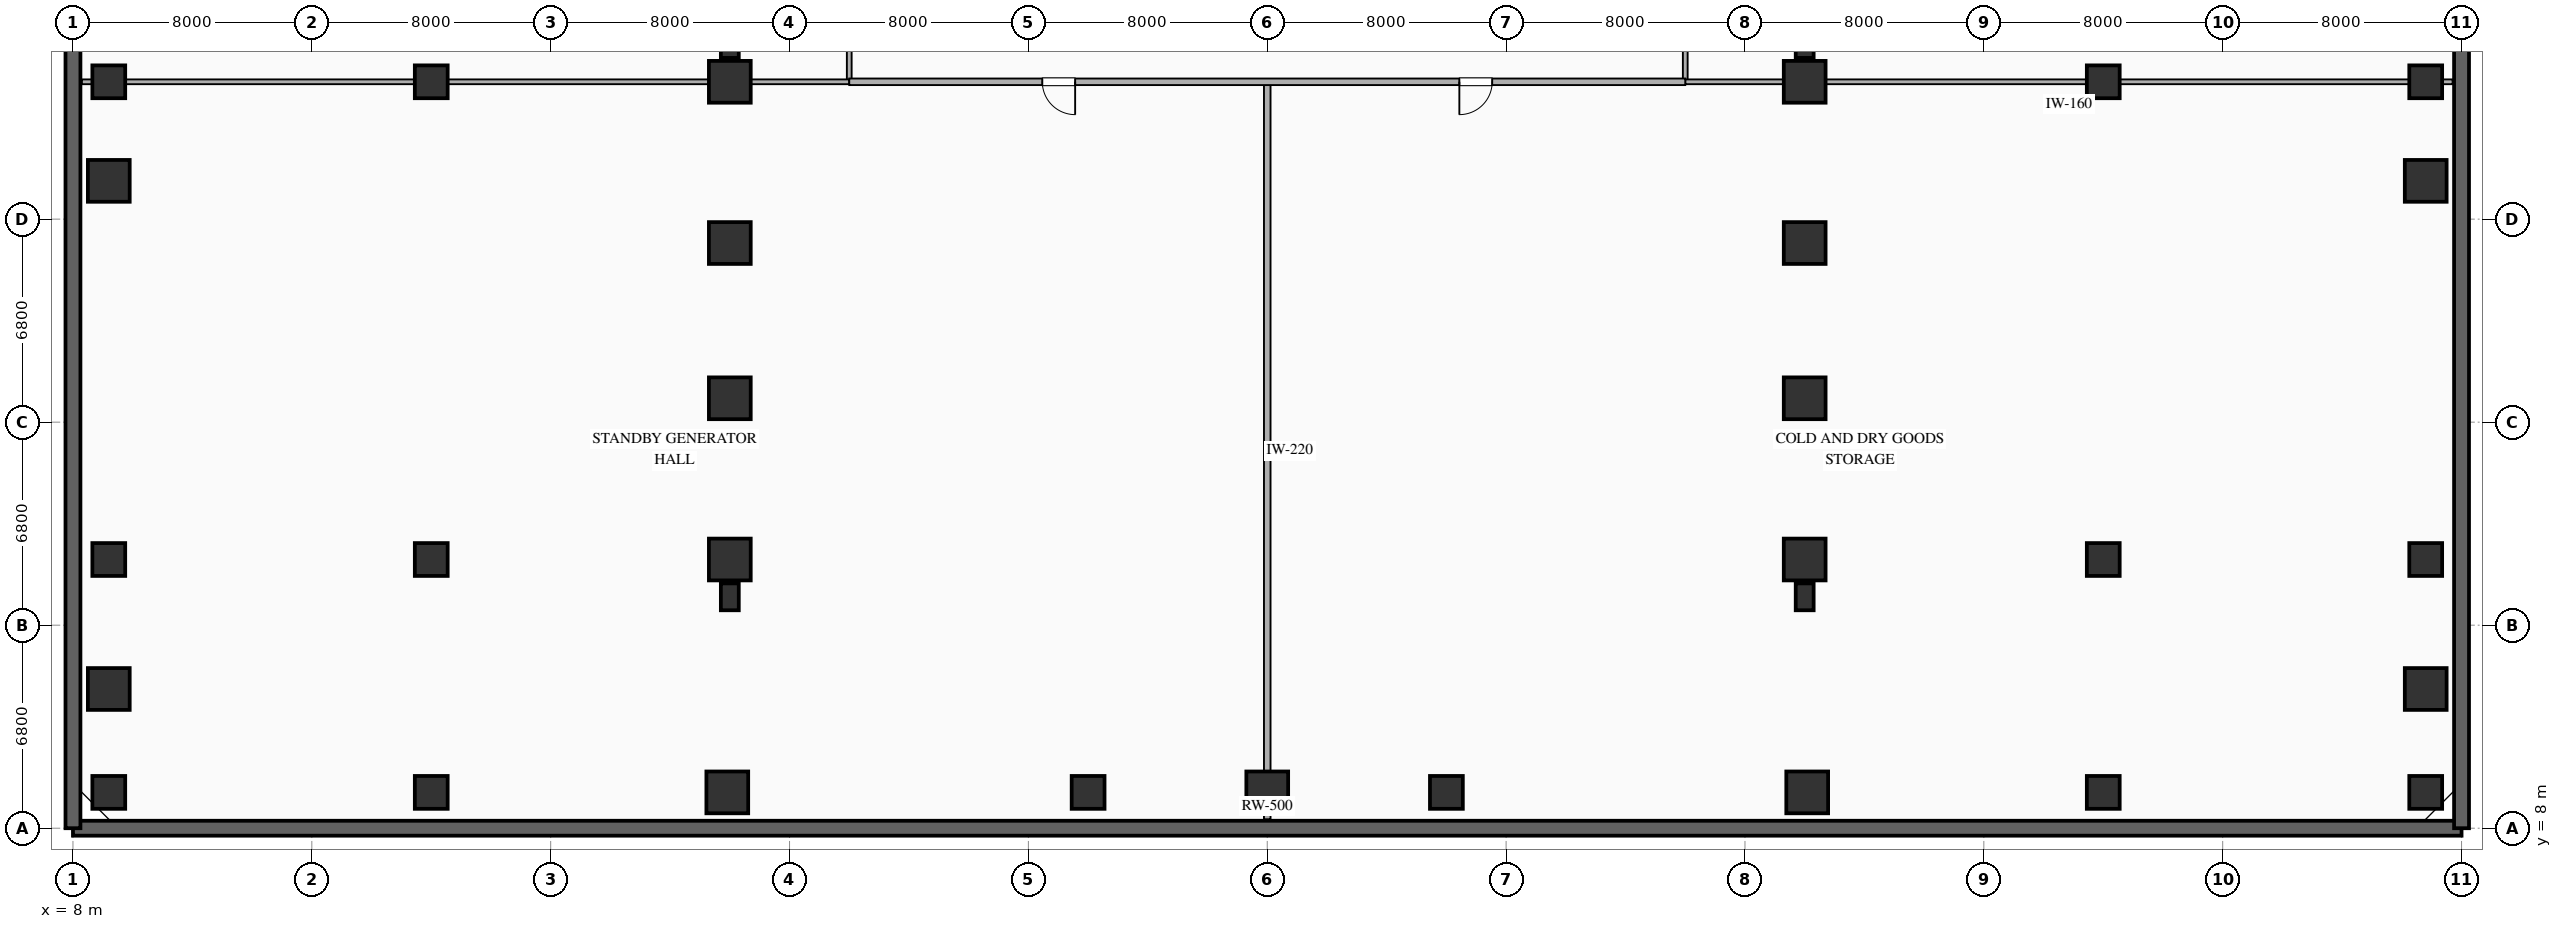
"""IFC4 building model, lengths in metres.
Left out: names, types, materials, properties, quantities, classifications, styles, units other than length and angle.
Written with IfcOpenShell. Run it as: python <this file> out.ifc"""

import sys

from ifc_helpers import new_model, si_unit, direction, frame, frame_2d, origin, origin_2d, place, context, subcontext, project, spatial, rectangle, extrude, element, fill, save


model = new_model("IFC4")
c1 = context("Model", 3, precision=1e-05, world=origin(), true_north=direction((0.0, 1.0)))
c2 = subcontext(c1, "Body", "Model", "MODEL_VIEW")
j1 = project(units=[si_unit("LENGTHUNIT", "METRE"), si_unit("PLANEANGLEUNIT", "RADIAN")], contexts=[c1])
p1 = place(None, origin())
s1 = spatial("IfcSite", under=j1, at=p1, CompositionType="ELEMENT")
p2 = place(p1, origin())
s2 = spatial("IfcBuilding", under=s1, at=p2, CompositionType="ELEMENT")
p3 = place(p2, frame((0.0, 0.0, -4.5)))
s3 = spatial("IfcBuildingStorey", under=s2, at=p3, CompositionType="ELEMENT", Elevation=-4.5)
p4 = place(p3, frame((8.0, 8.0, 0.0), z_axis=(0.0, 0.0, 1.0), x_axis=(1.0, 0.0, 0.0)))
e1 = element("IfcWall", 1, at=p4, inside=s3, PredefinedType="SOLIDWALL", context=c2, shape_type="SweptSolid", body=[
    extrude(rectangle(XDim=80.0, YDim=0.5, at=frame_2d((40.0, 0.0))), origin(), (0.0, 0.0, 1.0), 4.22),
])
for number, where, z_axis, x_axis in (
    (2, (88.0, 8.0, 0.0), (0.0, 0.0, 1.0), (0.0, 1.0, 0.0)),
    (3, (8.0, 76.0, 0.0), (0.0, 0.0, 1.0), (0.0, -1.0, 0.0)),
):
    element("IfcWall", number, at=place(p3, frame(where, z_axis=z_axis, x_axis=x_axis)), inside=s3, PredefinedType="SOLIDWALL", context=c2, shape_type="SweptSolid", body=[
        extrude(rectangle(XDim=68.0, YDim=0.5, at=frame_2d((34.0, 0.0))), origin(), (0.0, 0.0, 1.0), 4.22),
    ])
for number, where, z_axis, x_axis in (
    (4, (9.2, 9.2, 0.0), (0.0, 0.0, 1.0), (1.0, 0.0, 0.0)),
    (5, (20.0, 9.2, 0.0), (0.0, 0.0, 1.0), (1.0, 0.0, 0.0)),
    (6, (42.0, 9.2, 0.0), (0.0, 0.0, 1.0), (1.0, 0.0, 0.0)),
    (7, (54.0, 9.2, 0.0), (0.0, 0.0, 1.0), (1.0, 0.0, 0.0)),
    (8, (76.0, 9.2, 0.0), (0.0, 0.0, 1.0), (1.0, 0.0, 0.0)),
    (9, (86.8, 9.2, 0.0), (0.0, 0.0, 1.0), (1.0, 0.0, 0.0)),
    (10, (9.2, 17.0, 0.0), (0.0, 0.0, 1.0), (1.0, 0.0, 0.0)),
    (11, (86.8, 17.0, 0.0), (0.0, 0.0, 1.0), (1.0, 0.0, 0.0)),
    (12, (9.2, 33.0, 0.0), (0.0, 0.0, 1.0), (1.0, 0.0, 0.0)),
    (13, (86.8, 33.0, 0.0), (0.0, 0.0, 1.0), (1.0, 0.0, 0.0)),
    (14, (20.0, 17.0, 0.0), (0.0, 0.0, 1.0), (1.0, 0.0, 0.0)),
):
    element("IfcColumn", number, at=place(p3, frame(where, z_axis=z_axis, x_axis=x_axis)), inside=s3, PredefinedType="COLUMN", context=c2, shape_type="SweptSolid", body=[
        extrude(rectangle(XDim=1.1, YDim=1.1, at=origin_2d()), origin(), (0.0, 0.0, 1.0), 4.22),
    ])
for number, where, z_axis, x_axis in (
    (15, (30.0, 17.0, 0.0), (0.0, 0.0, 1.0), (1.0, 0.0, 0.0)),
    (16, (66.0, 17.0, 0.0), (0.0, 0.0, 1.0), (1.0, 0.0, 0.0)),
):
    element("IfcColumn", number, at=place(p3, frame(where, z_axis=z_axis, x_axis=x_axis)), inside=s3, PredefinedType="COLUMN", context=c2, shape_type="SweptSolid", body=[
        extrude(rectangle(XDim=1.4, YDim=1.4, at=origin_2d()), origin(), (0.0, 0.0, 1.0), 4.22),
    ])
for number, where, z_axis, x_axis in (
    (17, (76.0, 17.0, 0.0), (0.0, 0.0, 1.0), (1.0, 0.0, 0.0)),
    (18, (20.0, 33.0, 0.0), (0.0, 0.0, 1.0), (1.0, 0.0, 0.0)),
):
    element("IfcColumn", number, at=place(p3, frame(where, z_axis=z_axis, x_axis=x_axis)), inside=s3, PredefinedType="COLUMN", context=c2, shape_type="SweptSolid", body=[
        extrude(rectangle(XDim=1.1, YDim=1.1, at=origin_2d()), origin(), (0.0, 0.0, 1.0), 4.22),
    ])
for number, where, z_axis, x_axis in (
    (19, (30.0, 33.0, 0.0), (0.0, 0.0, 1.0), (1.0, 0.0, 0.0)),
    (20, (66.0, 33.0, 0.0), (0.0, 0.0, 1.0), (1.0, 0.0, 0.0)),
):
    element("IfcColumn", number, at=place(p3, frame(where, z_axis=z_axis, x_axis=x_axis)), inside=s3, PredefinedType="COLUMN", context=c2, shape_type="SweptSolid", body=[
        extrude(rectangle(XDim=1.4, YDim=1.4, at=origin_2d()), origin(), (0.0, 0.0, 1.0), 4.22),
    ])
p5 = place(p3, frame((76.0, 33.0, 0.0), z_axis=(0.0, 0.0, 1.0), x_axis=(1.0, 0.0, 0.0)))
e21 = element("IfcColumn", 21, at=p5, inside=s3, PredefinedType="COLUMN", context=c2, shape_type="SweptSolid", body=[
    extrude(rectangle(XDim=1.1, YDim=1.1, at=origin_2d()), origin(), (0.0, 0.0, 1.0), 4.22),
])
for number, where, z_axis, x_axis in (
    (22, (9.2, 29.682, 0.0), (0.0, 0.0, 1.0), (1.0, 0.0, 0.0)),
    (23, (9.2, 12.663, 0.0), (0.0, 0.0, 1.0), (1.0, 0.0, 0.0)),
    (24, (29.916, 9.2, 0.0), (0.0, 0.0, 1.0), (1.0, 0.0, 0.0)),
    (25, (48.0, 9.2, 0.0), (0.0, 0.0, 1.0), (1.0, 0.0, 0.0)),
    (26, (66.084, 9.2, 0.0), (0.0, 0.0, 1.0), (1.0, 0.0, 0.0)),
    (27, (86.8, 12.663, 0.0), (0.0, 0.0, 1.0), (1.0, 0.0, 0.0)),
    (28, (86.8, 29.682, 0.0), (0.0, 0.0, 1.0), (1.0, 0.0, 0.0)),
    (29, (30.0, 22.4, 0.0), (0.0, 0.0, 1.0), (1.0, 0.0, 0.0)),
    (30, (66.0, 22.4, 0.0), (0.0, 0.0, 1.0), (1.0, 0.0, 0.0)),
    (31, (30.0, 27.6, 0.0), (0.0, 0.0, 1.0), (1.0, 0.0, 0.0)),
    (32, (66.0, 27.6, 0.0), (0.0, 0.0, 1.0), (1.0, 0.0, 0.0)),
):
    element("IfcColumn", number, at=place(p3, frame(where, z_axis=z_axis, x_axis=x_axis)), inside=s3, PredefinedType="COLUMN", context=c2, shape_type="SweptSolid", body=[
        extrude(rectangle(XDim=1.4, YDim=1.4, at=origin_2d()), origin(), (0.0, 0.0, 1.0), 4.22),
    ])
for number, where, z_axis, x_axis in (
    (33, (30.0, 15.75, 0.0), (0.0, 0.0, 1.0), (1.0, 0.0, 0.0)),
    (34, (30.0, 34.25, 0.0), (0.0, 0.0, 1.0), (1.0, 0.0, 0.0)),
    (35, (66.0, 15.75, 0.0), (0.0, 0.0, 1.0), (1.0, 0.0, 0.0)),
    (36, (66.0, 34.25, 0.0), (0.0, 0.0, 1.0), (1.0, 0.0, 0.0)),
):
    element("IfcColumn", number, at=place(p3, frame(where, z_axis=z_axis, x_axis=x_axis)), inside=s3, PredefinedType="PILASTER", context=c2, shape_type="SweptSolid", body=[
        extrude(rectangle(XDim=0.6, YDim=0.9, at=origin_2d()), origin(), (0.0, 0.0, 1.0), 4.22),
    ])
p6 = place(p3, frame((34.0, 33.0, 0.0), z_axis=(0.0, 0.0, 1.0), x_axis=(0.0, 1.0, 0.0)))
e37 = element("IfcWall", 37, at=p6, inside=s3, PredefinedType="PLUMBINGWALL", context=c2, shape_type="SweptSolid", body=[
    extrude(rectangle(XDim=27.8, YDim=0.16, at=frame_2d((13.9, 0.0))), origin(), (0.0, 0.0, 1.0), 3.42),
])
p7 = place(p6, frame((13.35, 0.0, 0.0)))
e38 = element("IfcOpeningElement", 38, at=p7, cuts=e37, PredefinedType="OPENING", context=c2, shape_type="SweptSolid", body=[
    extrude(rectangle(XDim=1.1, YDim=2.2, at=frame_2d((0.55, 1.1))), frame((0.0, 0.09, 0.0), z_axis=(0.0, -1.0, 0.0), x_axis=(1.0, 0.0, 0.0)), (0.0, 0.0, 1.0), 0.18),
])
p8 = place(p3, frame((62.0, 60.8, 0.0), z_axis=(0.0, 0.0, 1.0), x_axis=(0.0, -1.0, 0.0)))
e39 = element("IfcWall", 39, at=p8, inside=s3, PredefinedType="PLUMBINGWALL", context=c2, shape_type="SweptSolid", body=[
    extrude(rectangle(XDim=27.8, YDim=0.16, at=frame_2d((13.9, 0.0))), origin(), (0.0, 0.0, 1.0), 3.42),
])
p9 = place(p8, frame((13.35, 0.0, 0.0)))
e40 = element("IfcOpeningElement", 40, at=p9, cuts=e39, PredefinedType="OPENING", context=c2, shape_type="SweptSolid", body=[
    extrude(rectangle(XDim=1.1, YDim=2.2, at=frame_2d((0.55, 1.1))), frame((0.0, 0.09, 0.0), z_axis=(0.0, -1.0, 0.0), x_axis=(1.0, 0.0, 0.0)), (0.0, 0.0, 1.0), 0.18),
])
for number, where, z_axis, x_axis in (
    (41, (87.7, 33.0, 0.0), (0.0, 0.0, 1.0), (-1.0, 0.0, 0.0)),
    (42, (34.0, 33.0, 0.0), (0.0, 0.0, 1.0), (-1.0, 0.0, 0.0)),
):
    element("IfcWall", number, at=place(p3, frame(where, z_axis=z_axis, x_axis=x_axis)), inside=s3, PredefinedType="PLUMBINGWALL", context=c2, shape_type="SweptSolid", body=[
        extrude(rectangle(XDim=25.7, YDim=0.16, at=frame_2d((12.85, 0.0))), origin(), (0.0, 0.0, 1.0), 3.42),
    ])
p10 = place(p3, frame((48.0, 33.0, 0.0), z_axis=(0.0, 0.0, 1.0), x_axis=(0.0, -1.0, 0.0)))
e43 = element("IfcWall", 43, at=p10, inside=s3, PredefinedType="SOLIDWALL", context=c2, shape_type="SweptSolid", body=[
    extrude(rectangle(XDim=24.7, YDim=0.22, at=frame_2d((12.35, 0.0))), origin(), (0.0, 0.0, 1.0), 3.42),
])
p11 = place(p3, frame((62.0, 33.0, 0.0), z_axis=(0.0, 0.0, 1.0), x_axis=(-1.0, 0.0, 0.0)))
e44 = element("IfcWall", 44, at=p11, inside=s3, PredefinedType="SOLIDWALL", context=c2, shape_type="SweptSolid", body=[
    extrude(rectangle(XDim=28.0, YDim=0.22, at=frame_2d((14.0, 0.0))), origin(), (0.0, 0.0, 1.0), 3.42),
])
p12 = place(p11, frame((20.434, 0.0, 0.0)))
e45 = element("IfcOpeningElement", 45, at=p12, cuts=e44, PredefinedType="OPENING", context=c2, shape_type="SweptSolid", body=[
    extrude(rectangle(XDim=1.1, YDim=2.2, at=frame_2d((0.55, 1.1))), frame((0.0, 0.12, 0.0), z_axis=(0.0, -1.0, 0.0), x_axis=(1.0, 0.0, 0.0)), (0.0, 0.0, 1.0), 0.24),
])
p13 = place(p11, frame((6.466, 0.0, 0.0)))
e46 = element("IfcOpeningElement", 46, at=p13, cuts=e44, PredefinedType="OPENING", context=c2, shape_type="SweptSolid", body=[
    extrude(rectangle(XDim=1.1, YDim=2.2, at=frame_2d((0.55, 1.1))), frame((0.0, 0.12, 0.0), z_axis=(0.0, -1.0, 0.0), x_axis=(1.0, 0.0, 0.0)), (0.0, 0.0, 1.0), 0.24),
])
p14 = place(p12, origin())
e47 = element("IfcDoor", 47, at=p14, inside=s3, OperationType="SINGLE_SWING_LEFT", PredefinedType="DOOR", context=c2, shape_type="SweptSolid", body=[
    extrude(rectangle(XDim=1.1, YDim=2.2, at=frame_2d((0.55, 1.1))), frame((0.0, 0.025, 0.0), z_axis=(0.0, -1.0, 0.0), x_axis=(1.0, 0.0, 0.0)), (0.0, 0.0, 1.0), 0.05),
])
fill(e45, e47)
p15 = place(p13, origin())
e48 = element("IfcDoor", 48, at=p15, inside=s3, OperationType="SINGLE_SWING_RIGHT", PredefinedType="DOOR", context=c2, shape_type="SweptSolid", body=[
    extrude(rectangle(XDim=1.1, YDim=2.2, at=frame_2d((0.55, 1.1))), frame((0.0, 0.025, 0.0), z_axis=(0.0, -1.0, 0.0), x_axis=(1.0, 0.0, 0.0)), (0.0, 0.0, 1.0), 0.05),
])
fill(e46, e48)
save(model, sys.argv[1])
